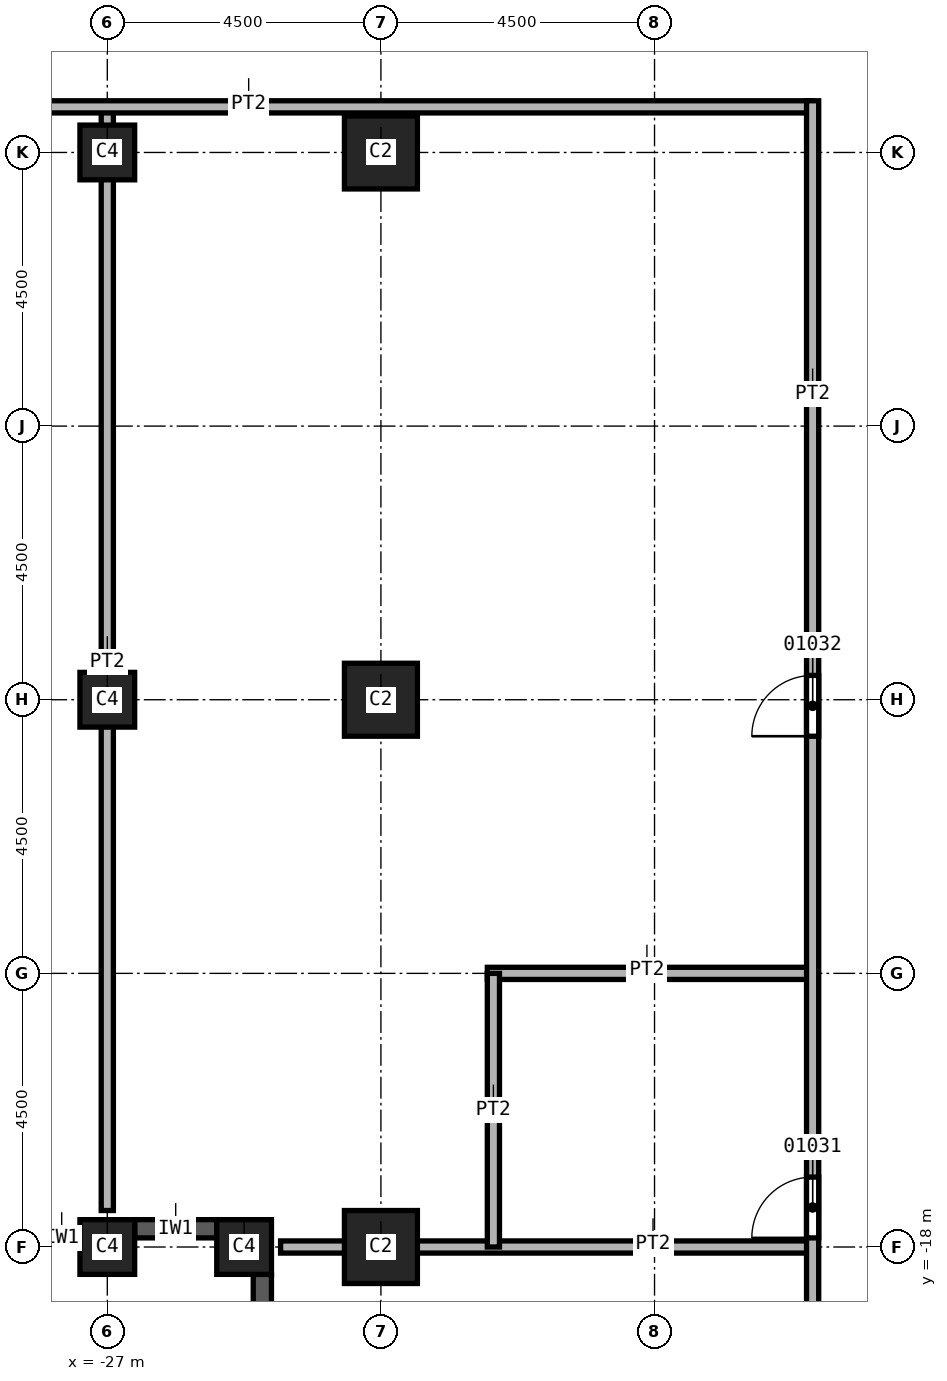
"""IFC4 building model, lengths in metres.
Left out: names, types, materials, properties, quantities, classifications, styles, units other than length and angle.
Written with IfcOpenShell. Run it as: python <this file> out.ifc"""

import sys

from ifc_helpers import new_model, si_unit, direction, frame, frame_2d, origin, origin_2d, place, context, subcontext, project, spatial, rectangle, extrude, element, fill, save


model = new_model("IFC4")
c1 = context("Model", 3, precision=1e-05, world=origin(), true_north=direction((0.0, 1.0)))
c2 = subcontext(c1, "Body", "Model", "MODEL_VIEW")
j1 = project(units=[si_unit("LENGTHUNIT", "METRE"), si_unit("PLANEANGLEUNIT", "RADIAN")], contexts=[c1])
p1 = place(None, origin())
s1 = spatial("IfcSite", under=j1, at=p1, CompositionType="ELEMENT")
p2 = place(p1, origin())
s2 = spatial("IfcBuilding", under=s1, at=p2, CompositionType="ELEMENT")
p3 = place(p2, frame((0.0, 0.0, 68.0)))
s3 = spatial("IfcBuildingStorey", under=s2, at=p3, CompositionType="ELEMENT", Elevation=68.0)
for number, where, z_axis, x_axis in (
    (1, (-22.5, 0.0, 0.0), (0.0, 0.0, 1.0), (1.0, 0.0, 0.0)),
    (2, (-22.5, -9.0, 0.0), (0.0, 0.0, 1.0), (1.0, 0.0, 0.0)),
    (3, (-22.5, -18.0, 0.0), (0.0, 0.0, 1.0), (1.0, 0.0, 0.0)),
):
    element("IfcColumn", number, at=place(p3, frame(where, z_axis=z_axis, x_axis=x_axis)), inside=s3, PredefinedType="COLUMN", context=c2, shape_type="SweptSolid", body=[
        extrude(rectangle(XDim=1.2, YDim=1.2, at=origin_2d()), origin(), (0.0, 0.0, 1.0), 3.7),
    ])
for number, where, z_axis, x_axis in (
    (4, (-27.0, 0.0, 0.0), (0.0, 0.0, 1.0), (1.0, 0.0, 0.0)),
    (5, (-27.0, -9.0, 0.0), (0.0, 0.0, 1.0), (1.0, 0.0, 0.0)),
    (6, (-27.0, -18.0, 0.0), (0.0, 0.0, 1.0), (1.0, 0.0, 0.0)),
    (7, (-24.75, -18.0, 0.0), (0.0, 0.0, 1.0), (1.0, 0.0, 0.0)),
):
    element("IfcColumn", number, at=place(p3, frame(where, z_axis=z_axis, x_axis=x_axis)), inside=s3, PredefinedType="COLUMN", context=c2, shape_type="SweptSolid", body=[
        extrude(rectangle(XDim=0.9, YDim=0.9, at=origin_2d()), origin(), (0.0, 0.0, 1.0), 3.7),
    ])
p4 = place(p3, frame((-31.05, -17.85, 0.0), z_axis=(0.0, 0.0, 1.0), x_axis=(1.0, 0.0, 0.0)))
e8 = element("IfcWall", 8, at=p4, inside=s3, PredefinedType="SOLIDWALL", context=c2, shape_type="SweptSolid", body=[
    extrude(rectangle(XDim=3.6, YDim=0.3, at=frame_2d((1.8, 0.0))), origin(), (0.0, 0.0, 1.0), 3.1),
])
p5 = place(p4, frame((0.6, 0.0, 0.8)))
e9 = element("IfcOpeningElement", 9, at=p5, cuts=e8, PredefinedType="OPENING", context=c2, shape_type="SweptSolid", body=[
    extrude(rectangle(XDim=2.4, YDim=1.95, at=frame_2d((1.2, 0.975))), frame((0.0, 0.15, 0.0), z_axis=(0.0, -1.0, 0.0), x_axis=(1.0, 0.0, 0.0)), (0.0, 0.0, 1.0), 0.3),
])
p6 = place(p3, frame((-26.55, -17.7, 0.0), z_axis=(0.0, 0.0, 1.0), x_axis=(1.0, 0.0, 0.0)))
e10 = element("IfcWall", 10, at=p6, inside=s3, PredefinedType="SOLIDWALL", context=c2, shape_type="SweptSolid", body=[
    extrude(rectangle(XDim=1.35, YDim=0.3, at=frame_2d((0.675, 0.0))), origin(), (0.0, 0.0, 1.0), 3.1),
])
p7 = place(p3, frame((-24.45, -18.45, 0.0), z_axis=(0.0, 0.0, 1.0), x_axis=(0.0, -1.0, 0.0)))
e11 = element("IfcWall", 11, at=p7, inside=s3, PredefinedType="SOLIDWALL", context=c2, shape_type="SweptSolid", body=[
    extrude(rectangle(XDim=2.5, YDim=0.3, at=frame_2d((1.25, 0.0))), origin(), (0.0, 0.0, 1.0), 3.1),
])
p8 = place(p3, frame((-27.0, -17.4, 0.0), z_axis=(0.0, 0.0, 1.0), x_axis=(0.0, 1.0, 0.0)))
e12 = element("IfcWall", 12, at=p8, inside=s3, PredefinedType="PARTITIONING", context=c2, shape_type="SweptSolid", body=[
    extrude(rectangle(XDim=18.15, YDim=0.2, at=frame_2d((9.075, 0.0))), origin(), (0.0, 0.0, 1.0), 3.7),
])
p9 = place(p3, frame((-15.4, 0.75, 0.0), z_axis=(0.0, 0.0, 1.0), x_axis=(-1.0, 0.0, 0.0)))
e13 = element("IfcWall", 13, at=p9, inside=s3, PredefinedType="PARTITIONING", context=c2, shape_type="SweptSolid", body=[
    extrude(rectangle(XDim=18.45, YDim=0.2, at=frame_2d((9.225, 0.0))), origin(), (0.0, 0.0, 1.0), 3.7),
])
p10 = place(p3, frame((-24.15, -18.0, 0.0), z_axis=(0.0, 0.0, 1.0), x_axis=(1.0, 0.0, 0.0)))
e14 = element("IfcWall", 14, at=p10, inside=s3, PredefinedType="PARTITIONING", context=c2, shape_type="SweptSolid", body=[
    extrude(rectangle(XDim=8.75, YDim=0.2, at=frame_2d((4.375, 0.0))), origin(), (0.0, 0.0, 1.0), 3.7),
])
p11 = place(p3, frame((-20.75, -13.5, 0.0), z_axis=(0.0, 0.0, 1.0), x_axis=(1.0, 0.0, 0.0)))
e15 = element("IfcWall", 15, at=p11, inside=s3, PredefinedType="PARTITIONING", context=c2, shape_type="SweptSolid", body=[
    extrude(rectangle(XDim=5.35, YDim=0.2, at=frame_2d((2.675, 0.0))), origin(), (0.0, 0.0, 1.0), 3.7),
])
p12 = place(p3, frame((-20.65, -18.0, 0.0), z_axis=(0.0, 0.0, 1.0), x_axis=(0.0, 1.0, 0.0)))
e16 = element("IfcWall", 16, at=p12, inside=s3, PredefinedType="PARTITIONING", context=c2, shape_type="SweptSolid", body=[
    extrude(rectangle(XDim=4.5, YDim=0.2, at=frame_2d((2.25, 0.0))), origin(), (0.0, 0.0, 1.0), 3.7),
])
p13 = place(p3, frame((-15.4, -24.5, 0.0), z_axis=(0.0, 0.0, 1.0), x_axis=(0.0, 1.0, 0.0)))
e17 = element("IfcWall", 17, at=p13, inside=s3, PredefinedType="PARTITIONING", context=c2, shape_type="SweptSolid", body=[
    extrude(rectangle(XDim=25.35, YDim=0.2, at=frame_2d((12.675, 0.0))), origin(), (0.0, 0.0, 1.0), 3.7),
])
p14 = place(p13, frame((1.15, 0.0, 0.0)))
e18 = element("IfcOpeningElement", 18, at=p14, cuts=e17, PredefinedType="OPENING", context=c2, shape_type="SweptSolid", body=[
    extrude(rectangle(XDim=1.0, YDim=2.1, at=frame_2d((0.5, 1.05))), frame((0.0, 0.1, 0.0), z_axis=(0.0, -1.0, 0.0), x_axis=(1.0, 0.0, 0.0)), (0.0, 0.0, 1.0), 0.2),
])
p15 = place(p13, frame((3.4, 0.0, 0.0)))
e19 = element("IfcOpeningElement", 19, at=p15, cuts=e17, PredefinedType="OPENING", context=c2, shape_type="SweptSolid", body=[
    extrude(rectangle(XDim=1.0, YDim=2.1, at=frame_2d((0.5, 1.05))), frame((0.0, 0.1, 0.0), z_axis=(0.0, -1.0, 0.0), x_axis=(1.0, 0.0, 0.0)), (0.0, 0.0, 1.0), 0.2),
])
p16 = place(p13, frame((6.65, 0.0, 0.0)))
e20 = element("IfcOpeningElement", 20, at=p16, cuts=e17, PredefinedType="OPENING", context=c2, shape_type="SweptSolid", body=[
    extrude(rectangle(XDim=1.0, YDim=2.1, at=frame_2d((0.5, 1.05))), frame((0.0, 0.1, 0.0), z_axis=(0.0, -1.0, 0.0), x_axis=(1.0, 0.0, 0.0)), (0.0, 0.0, 1.0), 0.2),
])
p17 = place(p13, frame((14.9, 0.0, 0.0)))
e21 = element("IfcOpeningElement", 21, at=p17, cuts=e17, PredefinedType="OPENING", context=c2, shape_type="SweptSolid", body=[
    extrude(rectangle(XDim=1.0, YDim=2.1, at=frame_2d((0.5, 1.05))), frame((0.0, 0.1, 0.0), z_axis=(0.0, -1.0, 0.0), x_axis=(1.0, 0.0, 0.0)), (0.0, 0.0, 1.0), 0.2),
])
p18 = place(p16, origin())
e22 = element("IfcDoor", 22, at=p18, inside=s3, OperationType="SINGLE_SWING_RIGHT", PredefinedType="DOOR", context=c2, shape_type="SweptSolid", body=[
    extrude(rectangle(XDim=1.0, YDim=2.1, at=frame_2d((0.5, 1.05))), frame((0.0, 0.025, 0.0), z_axis=(0.0, -1.0, 0.0), x_axis=(1.0, 0.0, 0.0)), (0.0, 0.0, 1.0), 0.05),
])
fill(e20, e22)
p19 = place(p17, origin())
e23 = element("IfcDoor", 23, at=p19, inside=s3, OperationType="SINGLE_SWING_LEFT", PredefinedType="DOOR", context=c2, shape_type="SweptSolid", body=[
    extrude(rectangle(XDim=1.0, YDim=2.1, at=frame_2d((0.5, 1.05))), frame((0.0, 0.025, 0.0), z_axis=(0.0, -1.0, 0.0), x_axis=(1.0, 0.0, 0.0)), (0.0, 0.0, 1.0), 0.05),
])
fill(e21, e23)
save(model, sys.argv[1])
